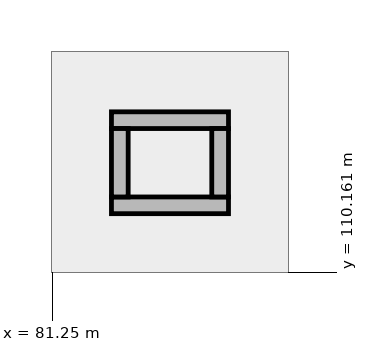
"""IFC4 building model, lengths in metres.
Left out: names, types, materials, properties, quantities, classifications, styles, units other than length and angle.
Written with IfcOpenShell. Run it as: python <this file> out.ifc"""

import sys

from ifc_helpers import new_model, si_unit, direction, frame, frame_2d, origin, place, context, subcontext, project, spatial, rectangle, extrude, element, save


model = new_model("IFC4")
c1 = context("Model", 3, precision=1e-05, world=origin(), true_north=direction((0.0, 1.0)))
c2 = subcontext(c1, "Body", "Model", "MODEL_VIEW")
j1 = project(units=[si_unit("LENGTHUNIT", "METRE"), si_unit("PLANEANGLEUNIT", "RADIAN")], contexts=[c1])
p1 = place(None, origin())
s1 = spatial("IfcSite", under=j1, at=p1, CompositionType="ELEMENT")
p2 = place(p1, origin())
s2 = spatial("IfcBuilding", under=s1, at=p2, CompositionType="ELEMENT")
p3 = place(p2, frame((0.0, 0.0, -4.5)))
s3 = spatial("IfcBuildingStorey", under=s2, at=p3, CompositionType="ELEMENT", Elevation=-4.5)
for number, where, z_axis, x_axis in (
    (1, (82.03, 111.04, 0.0), (0.0, 0.0, 1.0), (1.0, 0.0, 0.0)),
    (2, (82.03, 112.16, 0.0), (0.0, 0.0, 1.0), (1.0, 0.0, 0.0)),
):
    element("IfcWall", number, at=place(p3, frame(where, z_axis=z_axis, x_axis=x_axis)), inside=s3, PredefinedType="STANDARD", context=c2, shape_type="SweptSolid", body=[
        extrude(rectangle(XDim=1.54, YDim=0.22, at=frame_2d((0.77, 0.0))), origin(), (0.0, 0.0, 1.0), 3.19),
    ])
for number, where, z_axis, x_axis in (
    (3, (82.14, 111.15, 0.0), (0.0, 0.0, 1.0), (0.0, 1.0, 0.0)),
    (4, (83.46, 111.15, 0.0), (0.0, 0.0, 1.0), (0.0, 1.0, 0.0)),
):
    element("IfcWall", number, at=place(p3, frame(where, z_axis=z_axis, x_axis=x_axis)), inside=s3, PredefinedType="STANDARD", context=c2, shape_type="SweptSolid", body=[
        extrude(rectangle(XDim=0.9, YDim=0.22, at=frame_2d((0.45, 0.0))), origin(), (0.0, 0.0, 1.0), 3.19),
    ])
save(model, sys.argv[1])
